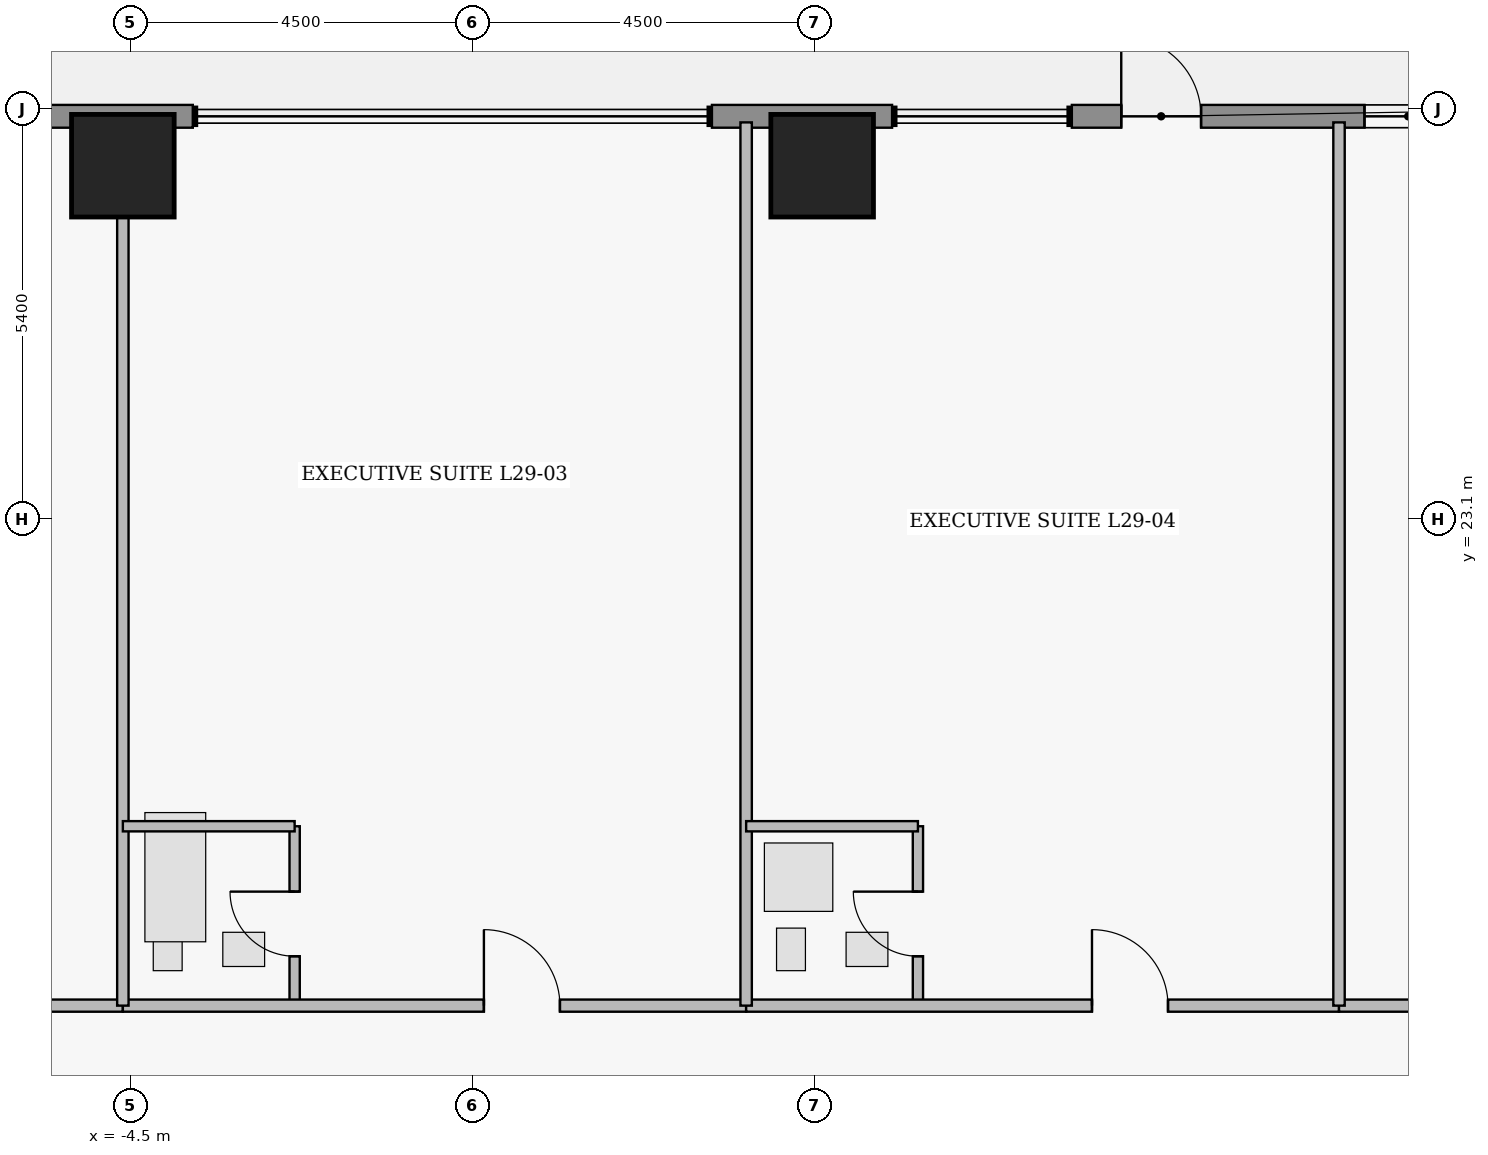
"""IFC4 building model, lengths in metres.
Left out: names, types, materials, properties, quantities, classifications, styles, units other than length and angle.
Written with IfcOpenShell. Run it as: python <this file> out.ifc"""

import sys

from ifc_helpers import new_model, si_unit, direction, frame, frame_2d, origin, origin_2d, place, context, subcontext, project, spatial, rectangle, extrude, element, fill, save


model = new_model("IFC4")
c1 = context("Model", 3, precision=1e-05, world=origin(), true_north=direction((0.0, 1.0)))
c2 = subcontext(c1, "Body", "Model", "MODEL_VIEW")
j1 = project(units=[si_unit("LENGTHUNIT", "METRE"), si_unit("PLANEANGLEUNIT", "RADIAN")], contexts=[c1])
p1 = place(None, origin())
s1 = spatial("IfcSite", under=j1, at=p1, CompositionType="ELEMENT")
p2 = place(p1, origin())
s2 = spatial("IfcBuilding", under=s1, at=p2, CompositionType="ELEMENT")
p3 = place(p2, frame((0.0, 0.0, 117.55)))
s3 = spatial("IfcBuildingStorey", under=s2, at=p3, CompositionType="ELEMENT", Elevation=117.55)
for number, where, z_axis, x_axis in (
    (1, (-4.6, 27.75, 0.0), (0.0, 0.0, 1.0), (1.0, 0.0, 0.0)),
    (2, (4.6, 27.75, 0.0), (0.0, 0.0, 1.0), (1.0, 0.0, 0.0)),
):
    element("IfcColumn", number, at=place(p3, frame(where, z_axis=z_axis, x_axis=x_axis)), inside=s3, PredefinedType="COLUMN", context=c2, shape_type="SweptSolid", body=[
        extrude(rectangle(XDim=1.35, YDim=1.35, at=origin_2d()), origin(), (0.0, 0.0, 1.0), 3.65),
    ])
p4 = place(p3, frame((-14.72, 28.4, 0.0), z_axis=(0.0, 0.0, 1.0), x_axis=(1.0, 0.0, 0.0)))
e3 = element("IfcWall", 3, at=p4, inside=s3, PredefinedType="STANDARD", context=c2, shape_type="SweptSolid", body=[
    extrude(rectangle(XDim=11.04, YDim=0.3, at=frame_2d((5.52, 0.0))), origin(), (0.0, 0.0, 1.0), 3.43),
])
p5 = place(p4, frame((4.98, 0.0, 0.85)))
e4 = element("IfcOpeningElement", 4, at=p5, cuts=e3, PredefinedType="OPENING", context=c2, shape_type="SweptSolid", body=[
    extrude(rectangle(XDim=1.6, YDim=1.8, at=frame_2d((0.8, 0.9))), frame((0.0, 0.16, 0.0), z_axis=(0.0, -1.0, 0.0), x_axis=(1.0, 0.0, 0.0)), (0.0, 0.0, 1.0), 0.32),
])
p6 = place(p4, frame((7.325, 0.0, 0.85)))
e5 = element("IfcOpeningElement", 5, at=p6, cuts=e3, PredefinedType="OPENING", context=c2, shape_type="SweptSolid", body=[
    extrude(rectangle(XDim=1.6, YDim=1.8, at=frame_2d((0.8, 0.9))), frame((0.0, 0.16, 0.0), z_axis=(0.0, -1.0, 0.0), x_axis=(1.0, 0.0, 0.0)), (0.0, 0.0, 1.0), 0.32),
])
p7 = place(p3, frame((3.15, 28.4, 0.0), z_axis=(0.0, 0.0, 1.0), x_axis=(1.0, 0.0, 0.0)))
e6 = element("IfcWall", 6, at=p7, inside=s3, PredefinedType="STANDARD", context=c2, shape_type="SweptSolid", body=[
    extrude(rectangle(XDim=2.37, YDim=0.3, at=frame_2d((1.185, 0.0))), origin(), (0.0, 0.0, 1.0), 3.43),
])
p8 = place(p3, frame((7.885, 28.4, 0.0), z_axis=(0.0, 0.0, 1.0), x_axis=(1.0, 0.0, 0.0)))
e7 = element("IfcWall", 7, at=p8, inside=s3, PredefinedType="STANDARD", context=c2, shape_type="SweptSolid", body=[
    extrude(rectangle(XDim=6.835, YDim=0.3, at=frame_2d((3.417, 0.0))), origin(), (0.0, 0.0, 1.0), 3.43),
])
p9 = place(p8, frame((0.65, 0.0, 0.0)))
e8 = element("IfcOpeningElement", 8, at=p9, cuts=e7, PredefinedType="OPENING", context=c2, shape_type="SweptSolid", body=[
    extrude(rectangle(XDim=1.05, YDim=2.2, at=frame_2d((0.525, 1.1))), frame((0.0, 0.16, 0.0), z_axis=(0.0, -1.0, 0.0), x_axis=(1.0, 0.0, 0.0)), (0.0, 0.0, 1.0), 0.32),
])
p10 = place(p8, frame((3.85, 0.0, 0.95)))
e9 = element("IfcOpeningElement", 9, at=p10, cuts=e7, PredefinedType="OPENING", context=c2, shape_type="SweptSolid", body=[
    extrude(rectangle(XDim=1.15, YDim=1.55, at=frame_2d((0.575, 0.775))), frame((0.0, 0.16, 0.0), z_axis=(0.0, -1.0, 0.0), x_axis=(1.0, 0.0, 0.0)), (0.0, 0.0, 1.0), 0.32),
])
p11 = place(p3, frame((-11.6, 16.7, 0.0), z_axis=(0.0, 0.0, 1.0), x_axis=(1.0, 0.0, 0.0)))
e10 = element("IfcWall", 10, at=p11, inside=s3, PredefinedType="PARTITIONING", context=c2, shape_type="SweptSolid", body=[
    extrude(rectangle(XDim=7.0, YDim=0.16, at=frame_2d((3.5, 0.0))), origin(), (0.0, 0.0, 1.0), 2.973),
])
p12 = place(p11, frame((4.15, 0.0, 0.0)))
e11 = element("IfcOpeningElement", 11, at=p12, cuts=e10, PredefinedType="OPENING", context=c2, shape_type="SweptSolid", body=[
    extrude(rectangle(XDim=1.0, YDim=2.15, at=frame_2d((0.5, 1.075))), frame((0.0, 0.09, 0.0), z_axis=(0.0, -1.0, 0.0), x_axis=(1.0, 0.0, 0.0)), (0.0, 0.0, 1.0), 0.18),
])
p13 = place(p3, frame((-2.34, 16.7, 0.0), z_axis=(0.0, 0.0, 1.0), x_axis=(0.0, 1.0, 0.0)))
e12 = element("IfcWall", 12, at=p13, inside=s3, PredefinedType="PLUMBINGWALL", context=c2, shape_type="SweptSolid", body=[
    extrude(rectangle(XDim=2.36, YDim=0.135, at=frame_2d((1.18, 0.0))), origin(), (0.0, 0.0, 1.0), 3.43),
])
p14 = place(p13, frame((0.65, 0.0, 0.0)))
e13 = element("IfcOpeningElement", 13, at=p14, cuts=e12, PredefinedType="OPENING", context=c2, shape_type="SweptSolid", body=[
    extrude(rectangle(XDim=0.85, YDim=2.1, at=frame_2d((0.425, 1.05))), frame((0.0, 0.077, 0.0), z_axis=(0.0, -1.0, 0.0), x_axis=(1.0, 0.0, 0.0)), (0.0, 0.0, 1.0), 0.155),
])
p15 = place(p3, frame((-4.6, 16.7, 0.0), z_axis=(0.0, 0.0, 1.0), x_axis=(1.0, 0.0, 0.0)))
e14 = element("IfcWall", 14, at=p15, inside=s3, PredefinedType="PARTITIONING", context=c2, shape_type="SweptSolid", body=[
    extrude(rectangle(XDim=8.2, YDim=0.16, at=frame_2d((4.1, 0.0))), origin(), (0.0, 0.0, 1.0), 2.973),
])
p16 = place(p15, frame((4.75, 0.0, 0.0)))
e15 = element("IfcOpeningElement", 15, at=p16, cuts=e14, PredefinedType="OPENING", context=c2, shape_type="SweptSolid", body=[
    extrude(rectangle(XDim=1.0, YDim=2.15, at=frame_2d((0.5, 1.075))), frame((0.0, 0.09, 0.0), z_axis=(0.0, -1.0, 0.0), x_axis=(1.0, 0.0, 0.0)), (0.0, 0.0, 1.0), 0.18),
])
p17 = place(p3, frame((5.86, 16.7, 0.0), z_axis=(0.0, 0.0, 1.0), x_axis=(0.0, 1.0, 0.0)))
e16 = element("IfcWall", 16, at=p17, inside=s3, PredefinedType="PLUMBINGWALL", context=c2, shape_type="SweptSolid", body=[
    extrude(rectangle(XDim=2.36, YDim=0.135, at=frame_2d((1.18, 0.0))), origin(), (0.0, 0.0, 1.0), 3.43),
])
p18 = place(p17, frame((0.65, 0.0, 0.0)))
e17 = element("IfcOpeningElement", 17, at=p18, cuts=e16, PredefinedType="OPENING", context=c2, shape_type="SweptSolid", body=[
    extrude(rectangle(XDim=0.85, YDim=2.1, at=frame_2d((0.425, 1.05))), frame((0.0, 0.077, 0.0), z_axis=(0.0, -1.0, 0.0), x_axis=(1.0, 0.0, 0.0)), (0.0, 0.0, 1.0), 0.155),
])
p19 = place(p3, frame((3.6, 16.7, 0.0), z_axis=(0.0, 0.0, 1.0), x_axis=(1.0, 0.0, 0.0)))
e18 = element("IfcWall", 18, at=p19, inside=s3, PredefinedType="PARTITIONING", context=c2, shape_type="SweptSolid", body=[
    extrude(rectangle(XDim=7.8, YDim=0.16, at=frame_2d((3.9, 0.0))), origin(), (0.0, 0.0, 1.0), 2.973),
])
p20 = place(p19, frame((4.55, 0.0, 0.0)))
e19 = element("IfcOpeningElement", 19, at=p20, cuts=e18, PredefinedType="OPENING", context=c2, shape_type="SweptSolid", body=[
    extrude(rectangle(XDim=1.0, YDim=2.15, at=frame_2d((0.5, 1.075))), frame((0.0, 0.09, 0.0), z_axis=(0.0, -1.0, 0.0), x_axis=(1.0, 0.0, 0.0)), (0.0, 0.0, 1.0), 0.18),
])
p21 = place(p3, frame((11.4, 16.7, 0.0), z_axis=(0.0, 0.0, 1.0), x_axis=(1.0, 0.0, 0.0)))
e20 = element("IfcWall", 20, at=p21, inside=s3, PredefinedType="PARTITIONING", context=c2, shape_type="SweptSolid", body=[
    extrude(rectangle(XDim=9.2, YDim=0.16, at=frame_2d((4.6, 0.0))), origin(), (0.0, 0.0, 1.0), 2.973),
])
p22 = place(p21, frame((4.06, 0.0, 0.0)))
e21 = element("IfcOpeningElement", 21, at=p22, cuts=e20, PredefinedType="OPENING", context=c2, shape_type="SweptSolid", body=[
    extrude(rectangle(XDim=1.08, YDim=2.18, at=frame_2d((0.54, 1.09))), frame((0.0, 0.09, 0.0), z_axis=(0.0, -1.0, 0.0), x_axis=(1.0, 0.0, 0.0)), (0.0, 0.0, 1.0), 0.18),
])
p23 = place(p3, frame((-4.6, 16.7, 0.0), z_axis=(0.0, 0.0, 1.0), x_axis=(0.0, 1.0, 0.0)))
e22 = element("IfcWall", 22, at=p23, inside=s3, PredefinedType="PARTITIONING", context=c2, shape_type="SweptSolid", body=[
    extrude(rectangle(XDim=11.62, YDim=0.15, at=frame_2d((5.81, 0.0))), origin(), (0.0, 0.0, 1.0), 2.503),
])
p24 = place(p3, frame((-4.6, 19.06, 0.0), z_axis=(0.0, 0.0, 1.0), x_axis=(1.0, 0.0, 0.0)))
e23 = element("IfcWall", 23, at=p24, inside=s3, PredefinedType="PLUMBINGWALL", context=c2, shape_type="SweptSolid", body=[
    extrude(rectangle(XDim=2.26, YDim=0.135, at=frame_2d((1.13, 0.0))), origin(), (0.0, 0.0, 1.0), 2.973),
])
p25 = place(p3, frame((3.6, 16.7, 0.0), z_axis=(0.0, 0.0, 1.0), x_axis=(0.0, 1.0, 0.0)))
e24 = element("IfcWall", 24, at=p25, inside=s3, PredefinedType="PARTITIONING", context=c2, shape_type="SweptSolid", body=[
    extrude(rectangle(XDim=11.62, YDim=0.15, at=frame_2d((5.81, 0.0))), origin(), (0.0, 0.0, 1.0), 3.43),
])
p26 = place(p3, frame((3.6, 19.06, 0.0), z_axis=(0.0, 0.0, 1.0), x_axis=(1.0, 0.0, 0.0)))
e25 = element("IfcWall", 25, at=p26, inside=s3, PredefinedType="PLUMBINGWALL", context=c2, shape_type="SweptSolid", body=[
    extrude(rectangle(XDim=2.26, YDim=0.135, at=frame_2d((1.13, 0.0))), origin(), (0.0, 0.0, 1.0), 2.973),
])
p27 = place(p3, frame((11.4, 16.7, 0.0), z_axis=(0.0, 0.0, 1.0), x_axis=(0.0, 1.0, 0.0)))
e26 = element("IfcWall", 26, at=p27, inside=s3, PredefinedType="PARTITIONING", context=c2, shape_type="SweptSolid", body=[
    extrude(rectangle(XDim=11.62, YDim=0.15, at=frame_2d((5.81, 0.0))), origin(), (0.0, 0.0, 1.0), 3.43),
])
p28 = place(p9, origin())
e27 = element("IfcDoor", 27, at=p28, inside=s3, OperationType="SINGLE_SWING_LEFT", PredefinedType="DOOR", context=c2, shape_type="SweptSolid", body=[
    extrude(rectangle(XDim=1.05, YDim=2.2, at=frame_2d((0.525, 1.1))), frame((0.0, 0.025, 0.0), z_axis=(0.0, -1.0, 0.0), x_axis=(1.0, 0.0, 0.0)), (0.0, 0.0, 1.0), 0.05),
])
fill(e8, e27)
p29 = place(p10, origin())
e28 = element("IfcWindow", 28, at=p29, inside=s3, PartitioningType="SINGLE_PANEL", PredefinedType="WINDOW", context=c2, shape_type="SweptSolid", body=[
    extrude(rectangle(XDim=1.15, YDim=1.55, at=frame_2d((0.575, 0.775))), frame((0.0, 0.03, 0.0), z_axis=(0.0, -1.0, 0.0), x_axis=(1.0, 0.0, 0.0)), (0.0, 0.0, 1.0), 0.06),
])
fill(e9, e28)
p30 = place(p14, origin())
e29 = element("IfcDoor", 29, at=p30, inside=s3, OperationType="SINGLE_SWING_RIGHT", PredefinedType="DOOR", context=c2, shape_type="SweptSolid", body=[
    extrude(rectangle(XDim=0.85, YDim=2.1, at=frame_2d((0.425, 1.05))), frame((0.0, 0.025, 0.0), z_axis=(0.0, -1.0, 0.0), x_axis=(1.0, 0.0, 0.0)), (0.0, 0.0, 1.0), 0.05),
])
fill(e13, e29)
p31 = place(p16, origin())
e30 = element("IfcDoor", 30, at=p31, inside=s3, OperationType="SINGLE_SWING_LEFT", PredefinedType="DOOR", context=c2, shape_type="SweptSolid", body=[
    extrude(rectangle(XDim=1.0, YDim=2.15, at=frame_2d((0.5, 1.075))), frame((0.0, 0.025, 0.0), z_axis=(0.0, -1.0, 0.0), x_axis=(1.0, 0.0, 0.0)), (0.0, 0.0, 1.0), 0.05),
])
fill(e15, e30)
p32 = place(p18, origin())
e31 = element("IfcDoor", 31, at=p32, inside=s3, OperationType="SINGLE_SWING_RIGHT", PredefinedType="DOOR", context=c2, shape_type="SweptSolid", body=[
    extrude(rectangle(XDim=0.85, YDim=2.1, at=frame_2d((0.425, 1.05))), frame((0.0, 0.025, 0.0), z_axis=(0.0, -1.0, 0.0), x_axis=(1.0, 0.0, 0.0)), (0.0, 0.0, 1.0), 0.05),
])
fill(e17, e31)
p33 = place(p20, origin())
e32 = element("IfcDoor", 32, at=p33, inside=s3, OperationType="SINGLE_SWING_LEFT", PredefinedType="DOOR", context=c2, shape_type="SweptSolid", body=[
    extrude(rectangle(XDim=1.0, YDim=2.15, at=frame_2d((0.5, 1.075))), frame((0.0, 0.025, 0.0), z_axis=(0.0, -1.0, 0.0), x_axis=(1.0, 0.0, 0.0)), (0.0, 0.0, 1.0), 0.05),
])
fill(e19, e32)
save(model, sys.argv[1])
